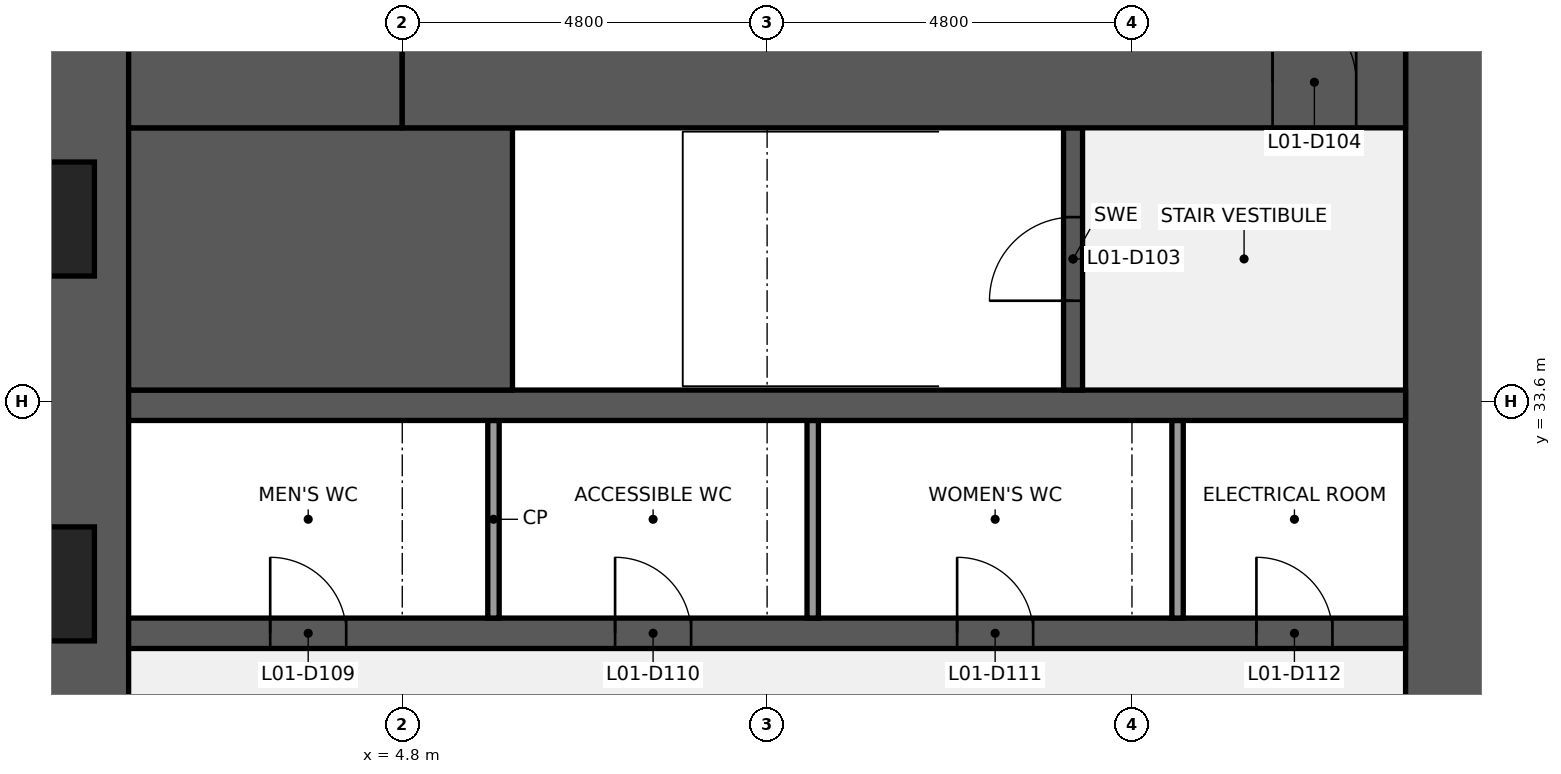
"""IFC4 building model, lengths in metres.
Left out: names, types, materials, properties, quantities, classifications, styles, units other than length and angle.
Written with IfcOpenShell. Run it as: python <this file> out.ifc"""

import sys

from ifc_helpers import new_model, si_unit, direction, frame, frame_2d, origin, place, context, subcontext, project, spatial, rectangle, extrude, element, fill, save


model = new_model("IFC4")
c1 = context("Model", 3, precision=1e-05, world=origin(), true_north=direction((0.0, 1.0)))
c2 = subcontext(c1, "Body", "Model", "MODEL_VIEW")
j1 = project(units=[si_unit("LENGTHUNIT", "METRE"), si_unit("PLANEANGLEUNIT", "RADIAN")], contexts=[c1])
p1 = place(None, origin())
s1 = spatial("IfcSite", under=j1, at=p1, CompositionType="ELEMENT")
p2 = place(p1, origin())
s2 = spatial("IfcBuilding", under=s1, at=p2, CompositionType="ELEMENT")
p3 = place(p2, frame((0.0, 0.0, 12.6)))
s3 = spatial("IfcBuildingStorey", under=s2, at=p3, CompositionType="ELEMENT", Elevation=12.6)
p4 = place(p3, frame((0.6, 9.6, 0.0), z_axis=(0.0, 0.0, 1.0), x_axis=(0.0, 1.0, 0.0)))
e1 = element("IfcWall", 1, at=p4, inside=s3, PredefinedType="SHEAR", context=c2, shape_type="SweptSolid", body=[
    extrude(rectangle(XDim=28.8, YDim=1.2, at=frame_2d((14.4, 0.0))), origin(), (0.0, 0.0, 1.0), 4.24),
])
p5 = place(p4, frame((8.85, 0.0, 0.9)))
e2 = element("IfcOpeningElement", 2, at=p5, cuts=e1, PredefinedType="OPENING", context=c2, shape_type="SweptSolid", body=[
    extrude(rectangle(XDim=1.5, YDim=1.5, at=frame_2d((0.75, 0.75))), frame((0.0, 0.61, 0.0), z_axis=(0.0, -1.0, 0.0), x_axis=(1.0, 0.0, 0.0)), (0.0, 0.0, 1.0), 1.22),
])
p6 = place(p4, frame((18.45, 0.0, 0.9)))
e3 = element("IfcOpeningElement", 3, at=p6, cuts=e1, PredefinedType="OPENING", context=c2, shape_type="SweptSolid", body=[
    extrude(rectangle(XDim=1.5, YDim=1.5, at=frame_2d((0.75, 0.75))), frame((0.0, 0.61, 0.0), z_axis=(0.0, -1.0, 0.0), x_axis=(1.0, 0.0, 0.0)), (0.0, 0.0, 1.0), 1.22),
])
p7 = place(p3, frame((18.6, 38.4, 0.0), z_axis=(0.0, 0.0, 1.0), x_axis=(0.0, -1.0, 0.0)))
e4 = element("IfcWall", 4, at=p7, inside=s3, PredefinedType="SHEAR", context=c2, shape_type="SweptSolid", body=[
    extrude(rectangle(XDim=28.8, YDim=1.2, at=frame_2d((14.4, 0.0))), origin(), (0.0, 0.0, 1.0), 4.24),
])
p8 = place(p7, frame((18.3, 0.0, 0.0)))
e5 = element("IfcOpeningElement", 5, at=p8, cuts=e4, PredefinedType="OPENING", context=c2, shape_type="SweptSolid", body=[
    extrude(rectangle(XDim=1.8, YDim=2.1, at=frame_2d((0.9, 1.05))), frame((0.0, 0.61, 0.0), z_axis=(0.0, -1.0, 0.0), x_axis=(1.0, 0.0, 0.0)), (0.0, 0.0, 1.0), 1.22),
])
p9 = place(p7, frame((8.7, 0.0, 0.0)))
e6 = element("IfcOpeningElement", 6, at=p9, cuts=e4, PredefinedType="OPENING", context=c2, shape_type="SweptSolid", body=[
    extrude(rectangle(XDim=1.8, YDim=2.1, at=frame_2d((0.9, 1.05))), frame((0.0, 0.61, 0.0), z_axis=(0.0, -1.0, 0.0), x_axis=(1.0, 0.0, 0.0)), (0.0, 0.0, 1.0), 1.22),
])
p10 = place(p3, frame((1.2, 30.55, 0.0), z_axis=(0.0, 0.0, 1.0), x_axis=(1.0, 0.0, 0.0)))
e7 = element("IfcWall", 7, at=p10, inside=s3, PredefinedType="SHEAR", context=c2, shape_type="SweptSolid", body=[
    extrude(rectangle(XDim=16.8, YDim=0.4, at=frame_2d((8.4, 0.0))), origin(), (0.0, 0.0, 1.0), 4.24),
])
p11 = place(p10, frame((1.863, 0.0, 0.0)))
e8 = element("IfcOpeningElement", 8, at=p11, cuts=e7, PredefinedType="OPENING", context=c2, shape_type="SweptSolid", body=[
    extrude(rectangle(XDim=1.0, YDim=2.1, at=frame_2d((0.5, 1.05))), frame((0.0, 0.21, 0.0), z_axis=(0.0, -1.0, 0.0), x_axis=(1.0, 0.0, 0.0)), (0.0, 0.0, 1.0), 0.42),
])
p12 = place(p10, frame((6.4, 0.0, 0.0)))
e9 = element("IfcOpeningElement", 9, at=p12, cuts=e7, PredefinedType="OPENING", context=c2, shape_type="SweptSolid", body=[
    extrude(rectangle(XDim=1.0, YDim=2.1, at=frame_2d((0.5, 1.05))), frame((0.0, 0.21, 0.0), z_axis=(0.0, -1.0, 0.0), x_axis=(1.0, 0.0, 0.0)), (0.0, 0.0, 1.0), 0.42),
])
p13 = place(p10, frame((10.9, 0.0, 0.0)))
e10 = element("IfcOpeningElement", 10, at=p13, cuts=e7, PredefinedType="OPENING", context=c2, shape_type="SweptSolid", body=[
    extrude(rectangle(XDim=1.0, YDim=2.1, at=frame_2d((0.5, 1.05))), frame((0.0, 0.21, 0.0), z_axis=(0.0, -1.0, 0.0), x_axis=(1.0, 0.0, 0.0)), (0.0, 0.0, 1.0), 0.42),
])
p14 = place(p10, frame((14.837, 0.0, 0.0)))
e11 = element("IfcOpeningElement", 11, at=p14, cuts=e7, PredefinedType="OPENING", context=c2, shape_type="SweptSolid", body=[
    extrude(rectangle(XDim=1.0, YDim=2.1, at=frame_2d((0.5, 1.05))), frame((0.0, 0.21, 0.0), z_axis=(0.0, -1.0, 0.0), x_axis=(1.0, 0.0, 0.0)), (0.0, 0.0, 1.0), 0.42),
])
for number, where, z_axis, x_axis in (
    (12, (6.0, 30.75, 0.0), (0.0, 0.0, 1.0), (0.0, 1.0, 0.0)),
    (13, (10.2, 30.75, 0.0), (0.0, 0.0, 1.0), (0.0, 1.0, 0.0)),
    (14, (15.0, 30.75, 0.0), (0.0, 0.0, 1.0), (0.0, 1.0, 0.0)),
):
    element("IfcWall", number, at=place(p3, frame(where, z_axis=z_axis, x_axis=x_axis)), inside=s3, PredefinedType="PARTITIONING", context=c2, shape_type="SweptSolid", body=[
        extrude(rectangle(XDim=2.6, YDim=0.15, at=frame_2d((1.3, 0.0))), origin(), (0.0, 0.0, 1.0), 4.24),
    ])
p15 = place(p3, frame((1.2, 33.55, 0.0), z_axis=(0.0, 0.0, 1.0), x_axis=(1.0, 0.0, 0.0)))
e15 = element("IfcWall", 15, at=p15, inside=s3, PredefinedType="SHEAR", context=c2, shape_type="SweptSolid", body=[
    extrude(rectangle(XDim=16.8, YDim=0.4, at=frame_2d((8.4, 0.0))), origin(), (0.0, 0.0, 1.0), 4.24),
])
p16 = place(p3, frame((1.2, 35.475, 0.0), z_axis=(0.0, 0.0, 1.0), x_axis=(1.0, 0.0, 0.0)))
e16 = element("IfcWall", 16, at=p16, inside=s3, PredefinedType="SHEAR", context=c2, shape_type="SweptSolid", body=[
    extrude(rectangle(XDim=5.05, YDim=3.45, at=frame_2d((2.525, 0.0))), origin(), (0.0, 0.0, 1.0), 4.24),
])
p17 = place(p3, frame((13.625, 33.75, 0.0), z_axis=(0.0, 0.0, 1.0), x_axis=(0.0, 1.0, 0.0)))
e17 = element("IfcWall", 17, at=p17, inside=s3, PredefinedType="SHEAR", context=c2, shape_type="SweptSolid", body=[
    extrude(rectangle(XDim=3.45, YDim=0.25, at=frame_2d((1.725, 0.0))), origin(), (0.0, 0.0, 1.0), 4.24),
])
p18 = place(p17, frame((1.175, 0.0, 0.0)))
e18 = element("IfcOpeningElement", 18, at=p18, cuts=e17, PredefinedType="OPENING", context=c2, shape_type="SweptSolid", body=[
    extrude(rectangle(XDim=1.1, YDim=2.1, at=frame_2d((0.55, 1.05))), frame((0.0, 0.135, 0.0), z_axis=(0.0, -1.0, 0.0), x_axis=(1.0, 0.0, 0.0)), (0.0, 0.0, 1.0), 0.27),
])
p19 = place(p3, frame((1.2, 37.8, 0.0), z_axis=(0.0, 0.0, 1.0), x_axis=(1.0, 0.0, 0.0)))
e19 = element("IfcWall", 19, at=p19, inside=s3, PredefinedType="SHEAR", context=c2, shape_type="SweptSolid", body=[
    extrude(rectangle(XDim=3.6, YDim=1.2, at=frame_2d((1.8, 0.0))), origin(), (0.0, 0.0, 1.0), 4.24),
])
p20 = place(p3, frame((4.8, 37.8, 0.0), z_axis=(0.0, 0.0, 1.0), x_axis=(1.0, 0.0, 0.0)))
e20 = element("IfcWall", 20, at=p20, inside=s3, PredefinedType="SHEAR", context=c2, shape_type="SweptSolid", body=[
    extrude(rectangle(XDim=13.2, YDim=1.2, at=frame_2d((6.6, 0.0))), origin(), (0.0, 0.0, 1.0), 4.24),
])
p21 = place(p20, frame((11.45, 0.0, 0.0)))
e21 = element("IfcOpeningElement", 21, at=p21, cuts=e20, PredefinedType="OPENING", context=c2, shape_type="SweptSolid", body=[
    extrude(rectangle(XDim=1.1, YDim=2.1, at=frame_2d((0.55, 1.05))), frame((0.0, 0.61, 0.0), z_axis=(0.0, -1.0, 0.0), x_axis=(1.0, 0.0, 0.0)), (0.0, 0.0, 1.0), 1.22),
])
p22 = place(p18, origin())
e22 = element("IfcDoor", 22, at=p22, inside=s3, OperationType="SINGLE_SWING_LEFT", PredefinedType="DOOR", context=c2, shape_type="SweptSolid", body=[
    extrude(rectangle(XDim=1.1, YDim=2.1, at=frame_2d((0.55, 1.05))), frame((0.0, 0.025, 0.0), z_axis=(0.0, -1.0, 0.0), x_axis=(1.0, 0.0, 0.0)), (0.0, 0.0, 1.0), 0.05),
])
fill(e18, e22)
p23 = place(p21, origin())
e23 = element("IfcDoor", 23, at=p23, inside=s3, OperationType="SINGLE_SWING_LEFT", PredefinedType="DOOR", context=c2, shape_type="SweptSolid", body=[
    extrude(rectangle(XDim=1.1, YDim=2.1, at=frame_2d((0.55, 1.05))), frame((0.0, 0.025, 0.0), z_axis=(0.0, -1.0, 0.0), x_axis=(1.0, 0.0, 0.0)), (0.0, 0.0, 1.0), 0.05),
])
fill(e21, e23)
p24 = place(p11, origin())
e24 = element("IfcDoor", 24, at=p24, inside=s3, OperationType="SINGLE_SWING_LEFT", PredefinedType="DOOR", context=c2, shape_type="SweptSolid", body=[
    extrude(rectangle(XDim=1.0, YDim=2.1, at=frame_2d((0.5, 1.05))), frame((0.0, 0.025, 0.0), z_axis=(0.0, -1.0, 0.0), x_axis=(1.0, 0.0, 0.0)), (0.0, 0.0, 1.0), 0.05),
])
fill(e8, e24)
p25 = place(p12, origin())
e25 = element("IfcDoor", 25, at=p25, inside=s3, OperationType="SINGLE_SWING_LEFT", PredefinedType="DOOR", context=c2, shape_type="SweptSolid", body=[
    extrude(rectangle(XDim=1.0, YDim=2.1, at=frame_2d((0.5, 1.05))), frame((0.0, 0.025, 0.0), z_axis=(0.0, -1.0, 0.0), x_axis=(1.0, 0.0, 0.0)), (0.0, 0.0, 1.0), 0.05),
])
fill(e9, e25)
p26 = place(p13, origin())
e26 = element("IfcDoor", 26, at=p26, inside=s3, OperationType="SINGLE_SWING_LEFT", PredefinedType="DOOR", context=c2, shape_type="SweptSolid", body=[
    extrude(rectangle(XDim=1.0, YDim=2.1, at=frame_2d((0.5, 1.05))), frame((0.0, 0.025, 0.0), z_axis=(0.0, -1.0, 0.0), x_axis=(1.0, 0.0, 0.0)), (0.0, 0.0, 1.0), 0.05),
])
fill(e10, e26)
p27 = place(p14, origin())
e27 = element("IfcDoor", 27, at=p27, inside=s3, OperationType="SINGLE_SWING_LEFT", PredefinedType="DOOR", context=c2, shape_type="SweptSolid", body=[
    extrude(rectangle(XDim=1.0, YDim=2.1, at=frame_2d((0.5, 1.05))), frame((0.0, 0.025, 0.0), z_axis=(0.0, -1.0, 0.0), x_axis=(1.0, 0.0, 0.0)), (0.0, 0.0, 1.0), 0.05),
])
fill(e11, e27)
save(model, sys.argv[1])
